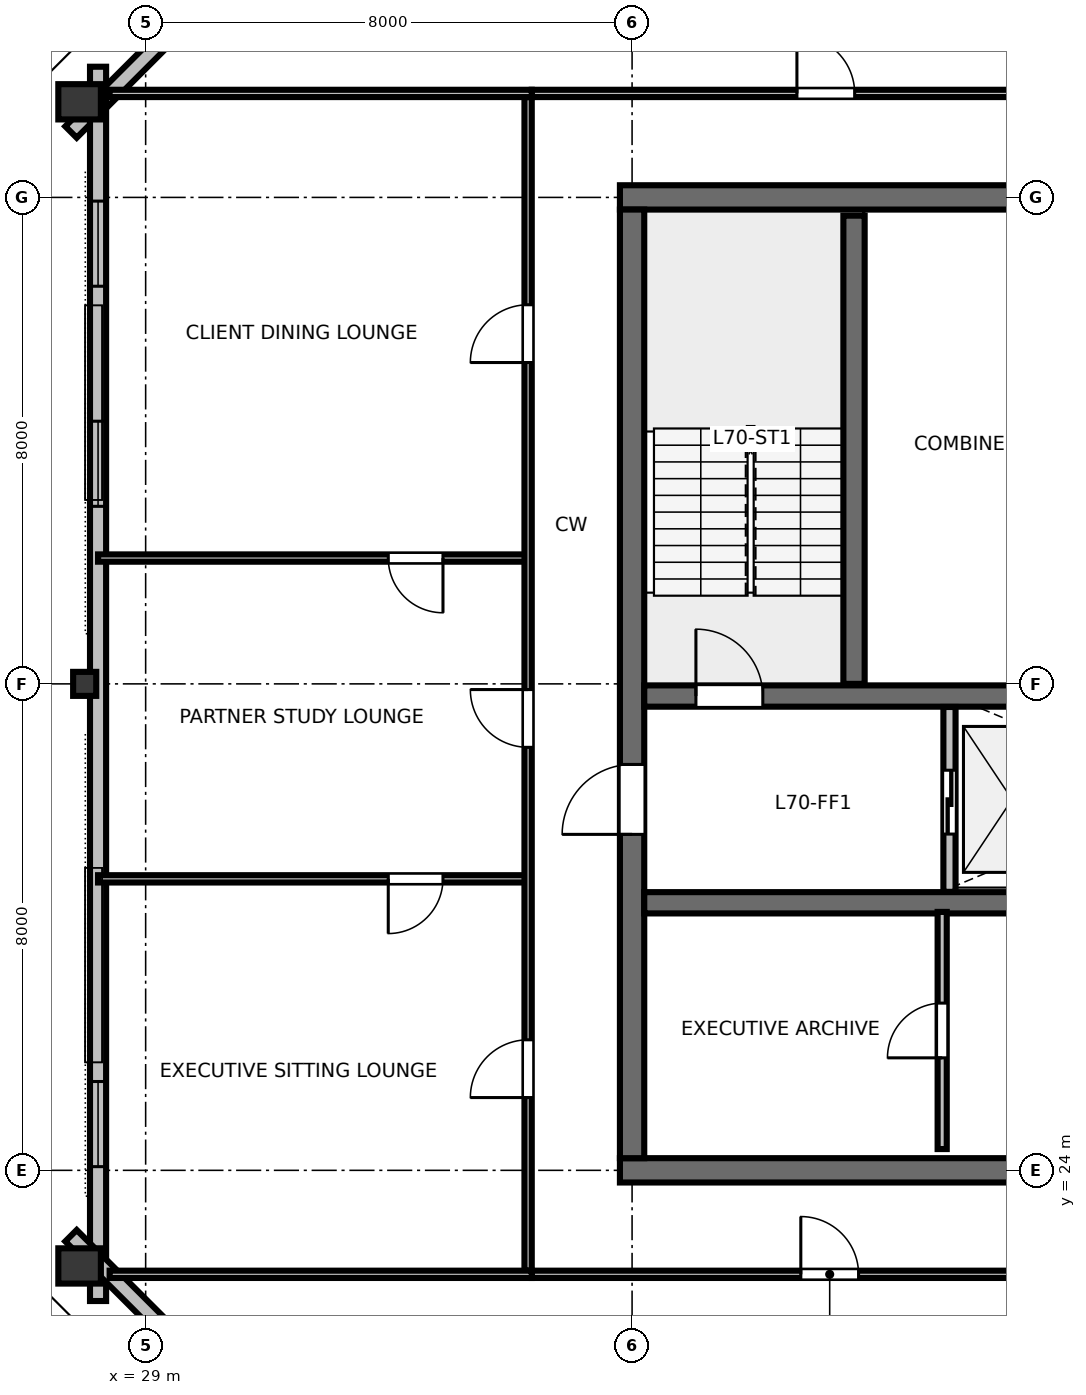
"""IFC4 building model, lengths in metres.
Left out: names, types, materials, properties, quantities, classifications, styles, units other than length and angle.
Written with IfcOpenShell. Run it as: python <this file> out.ifc"""

import sys

from ifc_helpers import new_model, si_unit, direction, frame, frame_2d, origin, origin_2d, place, context, subcontext, project, spatial, rectangle, hollow_rectangle, i_section, extrude, element, fill, save


model = new_model("IFC4")
c1 = context("Model", 3, precision=1e-05, world=origin(), true_north=direction((0.0, 1.0)))
c2 = subcontext(c1, "Body", "Model", "MODEL_VIEW")
j1 = project(units=[si_unit("LENGTHUNIT", "METRE"), si_unit("PLANEANGLEUNIT", "RADIAN")], contexts=[c1])
p1 = place(None, origin())
s1 = spatial("IfcSite", under=j1, at=p1, CompositionType="ELEMENT")
p2 = place(p1, origin())
s2 = spatial("IfcBuilding", under=s1, at=p2, CompositionType="ELEMENT")
p3 = place(p2, frame((0.0, 0.0, 264.6)))
s3 = spatial("IfcBuildingStorey", under=s2, at=p3, CompositionType="ELEMENT", Elevation=264.6)
p4 = place(p3, frame((36.8, 24.0, 0.0), z_axis=(0.0, 0.0, 1.0), x_axis=(1.0, 0.0, 0.0)))
e1 = element("IfcWall", 1, at=p4, inside=s3, PredefinedType="SHEAR", context=c2, shape_type="SweptSolid", body=[
    extrude(rectangle(XDim=18.4, YDim=0.4, at=frame_2d((9.2, 0.0))), origin(), (0.0, 0.0, 1.0), 3.36),
])
p5 = place(p4, frame((13.4, 0.0, 0.0)))
e2 = element("IfcOpeningElement", 2, at=p5, cuts=e1, PredefinedType="OPENING", context=c2, shape_type="SweptSolid", body=[
    extrude(rectangle(XDim=1.6, YDim=2.15, at=frame_2d((0.8, 1.075))), frame((0.0, 0.21, 0.0), z_axis=(0.0, -1.0, 0.0), x_axis=(1.0, 0.0, 0.0)), (0.0, 0.0, 1.0), 0.42),
])
p6 = place(p3, frame((36.8, 40.0, 0.0), z_axis=(0.0, 0.0, 1.0), x_axis=(1.0, 0.0, 0.0)))
e3 = element("IfcWall", 3, at=p6, inside=s3, PredefinedType="SHEAR", context=c2, shape_type="SweptSolid", body=[
    extrude(rectangle(XDim=18.4, YDim=0.4, at=frame_2d((9.2, 0.0))), origin(), (0.0, 0.0, 1.0), 3.36),
])
p7 = place(p6, frame((10.5, 0.0, 0.0)))
e4 = element("IfcOpeningElement", 4, at=p7, cuts=e3, PredefinedType="OPENING", context=c2, shape_type="SweptSolid", body=[
    extrude(rectangle(XDim=1.0, YDim=2.15, at=frame_2d((0.5, 1.075))), frame((0.0, 0.21, 0.0), z_axis=(0.0, -1.0, 0.0), x_axis=(1.0, 0.0, 0.0)), (0.0, 0.0, 1.0), 0.42),
])
p8 = place(p3, frame((37.0, 24.2, 0.0), z_axis=(0.0, 0.0, 1.0), x_axis=(0.0, 1.0, 0.0)))
e5 = element("IfcWall", 5, at=p8, inside=s3, PredefinedType="SHEAR", context=c2, shape_type="SweptSolid", body=[
    extrude(rectangle(XDim=15.6, YDim=0.4, at=frame_2d((7.8, 0.0))), origin(), (0.0, 0.0, 1.0), 3.36),
])
p9 = place(p8, frame((5.325, 0.0, 0.0)))
e6 = element("IfcOpeningElement", 6, at=p9, cuts=e5, PredefinedType="OPENING", context=c2, shape_type="SweptSolid", body=[
    extrude(rectangle(XDim=1.15, YDim=2.15, at=frame_2d((0.575, 1.075))), frame((0.0, 0.21, 0.0), z_axis=(0.0, -1.0, 0.0), x_axis=(1.0, 0.0, 0.0)), (0.0, 0.0, 1.0), 0.42),
])
p10 = place(p3, frame((37.2, 31.8, 0.0), z_axis=(0.0, 0.0, 1.0), x_axis=(1.0, 0.0, 0.0)))
e7 = element("IfcWall", 7, at=p10, inside=s3, PredefinedType="SHEAR", context=c2, shape_type="SweptSolid", body=[
    extrude(rectangle(XDim=17.6, YDim=0.35, at=frame_2d((8.8, 0.0))), origin(), (0.0, 0.0, 1.0), 3.36),
])
p11 = place(p10, frame((0.85, 0.0, 0.0)))
e8 = element("IfcOpeningElement", 8, at=p11, cuts=e7, PredefinedType="OPENING", context=c2, shape_type="SweptSolid", body=[
    extrude(rectangle(XDim=1.1, YDim=2.15, at=frame_2d((0.55, 1.075))), frame((0.0, 0.185, 0.0), z_axis=(0.0, -1.0, 0.0), x_axis=(1.0, 0.0, 0.0)), (0.0, 0.0, 1.0), 0.37),
])
p12 = place(p10, frame((14.75, 0.0, 0.0)))
e9 = element("IfcOpeningElement", 9, at=p12, cuts=e7, PredefinedType="OPENING", context=c2, shape_type="SweptSolid", body=[
    extrude(rectangle(XDim=1.1, YDim=2.15, at=frame_2d((0.55, 1.075))), frame((0.0, 0.185, 0.0), z_axis=(0.0, -1.0, 0.0), x_axis=(1.0, 0.0, 0.0)), (0.0, 0.0, 1.0), 0.37),
])
p13 = place(p3, frame((37.2, 28.4, 0.0), z_axis=(0.0, 0.0, 1.0), x_axis=(1.0, 0.0, 0.0)))
e10 = element("IfcWall", 10, at=p13, inside=s3, PredefinedType="SHEAR", context=c2, shape_type="SweptSolid", body=[
    extrude(rectangle(XDim=17.6, YDim=0.35, at=frame_2d((8.8, 0.0))), origin(), (0.0, 0.0, 1.0), 3.36),
])
p14 = place(p3, frame((27.914, 41.572, 0.0), z_axis=(0.0, 0.0, 1.0), x_axis=(0.0, 1.0, 0.0)))
e11 = element("IfcColumn", 11, at=p14, inside=s3, PredefinedType="COLUMN", context=c2, shape_type="SweptSolid", body=[
    extrude(hollow_rectangle(XDim=0.58, YDim=0.7, WallThickness=0.032, at=origin_2d()), origin(), (0.0, 0.0, 1.0), 3.373),
])
p15 = place(p3, frame((27.997, 32.0, 0.0), z_axis=(0.0, 0.0, 1.0), x_axis=(0.0, 1.0, 0.0)))
e12 = element("IfcColumn", 12, at=p15, inside=s3, PredefinedType="COLUMN", context=c2, shape_type="SweptSolid", body=[
    extrude(i_section(OverallWidth=0.395, OverallDepth=0.38, WebThickness=0.019, FlangeThickness=0.03, FilletRadius=0.025, at=origin_2d()), origin(), (0.0, 0.0, 1.0), 3.373),
])
p16 = place(p3, frame((27.914, 22.428, 0.0), z_axis=(0.0, 0.0, 1.0), x_axis=(0.0, 1.0, 0.0)))
e13 = element("IfcColumn", 13, at=p16, inside=s3, PredefinedType="COLUMN", context=c2, shape_type="SweptSolid", body=[
    extrude(hollow_rectangle(XDim=0.58, YDim=0.7, WallThickness=0.032, at=origin_2d()), origin(), (0.0, 0.0, 1.0), 3.373),
])
p17 = place(p3, frame((35.53, 48.832, 0.0), z_axis=(0.0, 0.0, 1.0), x_axis=(-0.707106781187, -0.707106781187, 0.0)))
e14 = element("IfcWall", 14, at=p17, inside=s3, PredefinedType="STANDARD", context=c2, shape_type="SweptSolid", body=[
    extrude(rectangle(XDim=10.971, YDim=0.265, at=frame_2d((5.485, 0.0))), origin(), (0.0, 0.0, 1.0), 2.832),
])
p18 = place(p3, frame((28.217, 42.149, 0.0), z_axis=(0.0, 0.0, 1.0), x_axis=(0.0, -1.0, 0.0)))
e15 = element("IfcWall", 15, at=p18, inside=s3, PredefinedType="STANDARD", context=c2, shape_type="SweptSolid", body=[
    extrude(rectangle(XDim=20.298, YDim=0.265, at=frame_2d((10.149, 0.0))), origin(), (0.0, 0.0, 1.0), 2.832),
])
p19 = place(p18, frame((2.21, 0.0, 0.85)))
e16 = element("IfcOpeningElement", 16, at=p19, cuts=e15, PredefinedType="OPENING", context=c2, shape_type="SweptSolid", body=[
    extrude(rectangle(XDim=1.4, YDim=1.2, at=frame_2d((0.7, 0.6))), frame((0.0, 0.142, 0.0), z_axis=(0.0, -1.0, 0.0), x_axis=(1.0, 0.0, 0.0)), (0.0, 0.0, 1.0), 0.285),
])
p20 = place(p18, frame((5.83, 0.0, 0.85)))
e17 = element("IfcOpeningElement", 17, at=p20, cuts=e15, PredefinedType="OPENING", context=c2, shape_type="SweptSolid", body=[
    extrude(rectangle(XDim=1.4, YDim=1.2, at=frame_2d((0.7, 0.6))), frame((0.0, 0.142, 0.0), z_axis=(0.0, -1.0, 0.0), x_axis=(1.0, 0.0, 0.0)), (0.0, 0.0, 1.0), 0.285),
])
p21 = place(p18, frame((16.688, 0.0, 0.85)))
e18 = element("IfcOpeningElement", 18, at=p21, cuts=e15, PredefinedType="OPENING", context=c2, shape_type="SweptSolid", body=[
    extrude(rectangle(XDim=1.4, YDim=1.2, at=frame_2d((0.7, 0.6))), frame((0.0, 0.142, 0.0), z_axis=(0.0, -1.0, 0.0), x_axis=(1.0, 0.0, 0.0)), (0.0, 0.0, 1.0), 0.285),
])
p22 = place(p3, frame((27.772, 22.925, 0.0), z_axis=(0.0, 0.0, 1.0), x_axis=(0.707106781187, -0.707106781187, 0.0)))
e19 = element("IfcWall", 19, at=p22, inside=s3, PredefinedType="STANDARD", context=c2, shape_type="SweptSolid", body=[
    extrude(rectangle(XDim=10.971, YDim=0.265, at=frame_2d((5.485, 0.0))), origin(), (0.0, 0.0, 1.0), 2.832),
])
p23 = place(p3, frame((40.65, 32.0, 0.0), z_axis=(0.0, 0.0, 1.0), x_axis=(0.0, 1.0, 0.0)))
e20 = element("IfcWall", 20, at=p23, inside=s3, PredefinedType="SHEAR", context=c2, shape_type="SweptSolid", body=[
    extrude(rectangle(XDim=7.7, YDim=0.35, at=frame_2d((3.85, 0.0))), origin(), (0.0, 0.0, 1.0), 3.6),
])
p24 = place(p3, frame((42.22, 28.58, 0.0), z_axis=(0.0, 0.0, 1.0), x_axis=(0.0, 1.0, 0.0)))
e21 = element("IfcWall", 21, at=p24, inside=s3, PredefinedType="PARTITIONING", context=c2, shape_type="SweptSolid", body=[
    extrude(rectangle(XDim=3.04, YDim=0.2, at=frame_2d((1.52, 0.0))), origin(), (0.0, 0.0, 1.0), 3.375),
])
p25 = place(p24, frame((0.95, 0.0, 0.0)))
e22 = element("IfcOpeningElement", 22, at=p25, cuts=e21, PredefinedType="OPENING", context=c2, shape_type="SweptSolid", body=[
    extrude(rectangle(XDim=1.05, YDim=2.15, at=frame_2d((0.525, 1.075))), frame((0.0, 0.11, 0.0), z_axis=(0.0, -1.0, 0.0), x_axis=(1.0, 0.0, 0.0)), (0.0, 0.0, 1.0), 0.22),
])
p26 = place(p3, frame((42.1, 24.35, 0.0), z_axis=(0.0, 0.0, 1.0), x_axis=(0.0, 1.0, 0.0)))
e23 = element("IfcWall", 23, at=p26, inside=s3, PredefinedType="PARTITIONING", context=c2, shape_type="SweptSolid", body=[
    extrude(rectangle(XDim=3.9, YDim=0.15, at=frame_2d((1.95, 0.0))), origin(), (0.0, 0.0, 1.0), 3.375),
])
p27 = place(p26, frame((1.5, 0.0, 0.0)))
e24 = element("IfcOpeningElement", 24, at=p27, cuts=e23, PredefinedType="OPENING", context=c2, shape_type="SweptSolid", body=[
    extrude(rectangle(XDim=0.9, YDim=2.15, at=frame_2d((0.45, 1.075))), frame((0.0, 0.085, 0.0), z_axis=(0.0, -1.0, 0.0), x_axis=(1.0, 0.0, 0.0)), (0.0, 0.0, 1.0), 0.17),
])
p28 = place(p3, frame((35.35, 22.29, 0.0), z_axis=(0.0, 0.0, 1.0), x_axis=(1.0, 0.0, 0.0)))
e25 = element("IfcWall", 25, at=p28, inside=s3, PredefinedType="PARTITIONING", context=c2, shape_type="SweptSolid", body=[
    extrude(rectangle(XDim=21.3, YDim=0.12, at=frame_2d((10.65, 0.0))), origin(), (0.0, 0.0, 1.0), 2.655),
])
p29 = place(p28, frame((4.425, 0.0, 0.0)))
e26 = element("IfcOpeningElement", 26, at=p29, cuts=e25, PredefinedType="OPENING", context=c2, shape_type="SweptSolid", body=[
    extrude(rectangle(XDim=0.95, YDim=2.15, at=frame_2d((0.475, 1.075))), frame((0.0, 0.07, 0.0), z_axis=(0.0, -1.0, 0.0), x_axis=(1.0, 0.0, 0.0)), (0.0, 0.0, 1.0), 0.14),
])
p30 = place(p28, frame((13.051, 0.0, 0.0)))
e27 = element("IfcOpeningElement", 27, at=p30, cuts=e25, PredefinedType="OPENING", context=c2, shape_type="SweptSolid", body=[
    extrude(rectangle(XDim=0.95, YDim=2.15, at=frame_2d((0.475, 1.075))), frame((0.0, 0.07, 0.0), z_axis=(0.0, -1.0, 0.0), x_axis=(1.0, 0.0, 0.0)), (0.0, 0.0, 1.0), 0.14),
])
p31 = place(p28, frame((17.811, 0.0, 0.0)))
e28 = element("IfcOpeningElement", 28, at=p31, cuts=e25, PredefinedType="OPENING", context=c2, shape_type="SweptSolid", body=[
    extrude(rectangle(XDim=0.95, YDim=2.15, at=frame_2d((0.475, 1.075))), frame((0.0, 0.07, 0.0), z_axis=(0.0, -1.0, 0.0), x_axis=(1.0, 0.0, 0.0)), (0.0, 0.0, 1.0), 0.14),
])
p32 = place(p3, frame((35.35, 41.71, 0.0), z_axis=(0.0, 0.0, 1.0), x_axis=(1.0, 0.0, 0.0)))
e29 = element("IfcWall", 29, at=p32, inside=s3, PredefinedType="PARTITIONING", context=c2, shape_type="SweptSolid", body=[
    extrude(rectangle(XDim=21.3, YDim=0.12, at=frame_2d((10.65, 0.0))), origin(), (0.0, 0.0, 1.0), 2.655),
])
p33 = place(p32, frame((4.361, 0.0, 0.0)))
e30 = element("IfcOpeningElement", 30, at=p33, cuts=e29, PredefinedType="OPENING", context=c2, shape_type="SweptSolid", body=[
    extrude(rectangle(XDim=0.95, YDim=2.15, at=frame_2d((0.475, 1.075))), frame((0.0, 0.07, 0.0), z_axis=(0.0, -1.0, 0.0), x_axis=(1.0, 0.0, 0.0)), (0.0, 0.0, 1.0), 0.14),
])
p34 = place(p32, frame((15.925, 0.0, 0.0)))
e31 = element("IfcOpeningElement", 31, at=p34, cuts=e29, PredefinedType="OPENING", context=c2, shape_type="SweptSolid", body=[
    extrude(rectangle(XDim=0.95, YDim=2.15, at=frame_2d((0.475, 1.075))), frame((0.0, 0.07, 0.0), z_axis=(0.0, -1.0, 0.0), x_axis=(1.0, 0.0, 0.0)), (0.0, 0.0, 1.0), 0.14),
])
p35 = place(p3, frame((35.29, 28.794, 0.0), z_axis=(0.0, 0.0, 1.0), x_axis=(-1.0, 0.0, 0.0)))
e32 = element("IfcWall", 32, at=p35, inside=s3, PredefinedType="PARTITIONING", context=c2, shape_type="SweptSolid", body=[
    extrude(rectangle(XDim=7.073, YDim=0.12, at=frame_2d((3.536, 0.0))), origin(), (0.0, 0.0, 1.0), 2.655),
])
p36 = place(p35, frame((1.4, 0.0, 0.0)))
e33 = element("IfcOpeningElement", 33, at=p36, cuts=e32, PredefinedType="OPENING", context=c2, shape_type="SweptSolid", body=[
    extrude(rectangle(XDim=0.9, YDim=2.15, at=frame_2d((0.45, 1.075))), frame((0.0, 0.07, 0.0), z_axis=(0.0, -1.0, 0.0), x_axis=(1.0, 0.0, 0.0)), (0.0, 0.0, 1.0), 0.14),
])
p37 = place(p3, frame((35.29, 34.069, 0.0), z_axis=(0.0, 0.0, 1.0), x_axis=(-1.0, 0.0, 0.0)))
e34 = element("IfcWall", 34, at=p37, inside=s3, PredefinedType="PARTITIONING", context=c2, shape_type="SweptSolid", body=[
    extrude(rectangle(XDim=7.073, YDim=0.12, at=frame_2d((3.536, 0.0))), origin(), (0.0, 0.0, 1.0), 2.655),
])
p38 = place(p37, frame((1.4, 0.0, 0.0)))
e35 = element("IfcOpeningElement", 35, at=p38, cuts=e34, PredefinedType="OPENING", context=c2, shape_type="SweptSolid", body=[
    extrude(rectangle(XDim=0.9, YDim=2.15, at=frame_2d((0.45, 1.075))), frame((0.0, 0.07, 0.0), z_axis=(0.0, -1.0, 0.0), x_axis=(1.0, 0.0, 0.0)), (0.0, 0.0, 1.0), 0.14),
])
p39 = place(p3, frame((35.29, 22.35, 0.0), z_axis=(0.0, 0.0, 1.0), x_axis=(0.0, 1.0, 0.0)))
e36 = element("IfcWall", 36, at=p39, inside=s3, PredefinedType="PARTITIONING", context=c2, shape_type="SweptSolid", body=[
    extrude(rectangle(XDim=19.3, YDim=0.12, at=frame_2d((9.65, 0.0))), origin(), (0.0, 0.0, 1.0), 2.655),
])
p40 = place(p39, frame((2.847, 0.0, 0.0)))
e37 = element("IfcOpeningElement", 37, at=p40, cuts=e36, PredefinedType="OPENING", context=c2, shape_type="SweptSolid", body=[
    extrude(rectangle(XDim=0.95, YDim=2.15, at=frame_2d((0.475, 1.075))), frame((0.0, 0.07, 0.0), z_axis=(0.0, -1.0, 0.0), x_axis=(1.0, 0.0, 0.0)), (0.0, 0.0, 1.0), 0.14),
])
p41 = place(p39, frame((8.606, 0.0, 0.0)))
e38 = element("IfcOpeningElement", 38, at=p41, cuts=e36, PredefinedType="OPENING", context=c2, shape_type="SweptSolid", body=[
    extrude(rectangle(XDim=0.95, YDim=2.15, at=frame_2d((0.475, 1.075))), frame((0.0, 0.07, 0.0), z_axis=(0.0, -1.0, 0.0), x_axis=(1.0, 0.0, 0.0)), (0.0, 0.0, 1.0), 0.14),
])
p42 = place(p39, frame((14.935, 0.0, 0.0)))
e39 = element("IfcOpeningElement", 39, at=p42, cuts=e36, PredefinedType="OPENING", context=c2, shape_type="SweptSolid", body=[
    extrude(rectangle(XDim=0.95, YDim=2.15, at=frame_2d((0.475, 1.075))), frame((0.0, 0.07, 0.0), z_axis=(0.0, -1.0, 0.0), x_axis=(1.0, 0.0, 0.0)), (0.0, 0.0, 1.0), 0.14),
])
for number, where, z_axis, x_axis in (
    (40, (35.35, 22.29, 0.0), (0.0, 0.0, 1.0), (-1.0, 0.0, 0.0)),
    (41, (35.35, 41.71, 0.0), (0.0, 0.0, 1.0), (-1.0, 0.0, 0.0)),
):
    element("IfcWall", number, at=place(p3, frame(where, z_axis=z_axis, x_axis=x_axis)), inside=s3, PredefinedType="PARTITIONING", context=c2, shape_type="SweptSolid", body=[
        extrude(rectangle(XDim=6.942, YDim=0.12, at=frame_2d((3.471, 0.0))), origin(), (0.0, 0.0, 1.0), 2.655),
    ])
p43 = place(p19, origin())
e42 = element("IfcWindow", 42, at=p43, inside=s3, PartitioningType="SINGLE_PANEL", PredefinedType="WINDOW", context=c2, shape_type="SweptSolid", body=[
    extrude(rectangle(XDim=1.4, YDim=1.2, at=frame_2d((0.7, 0.6))), frame((0.0, 0.03, 0.0), z_axis=(0.0, -1.0, 0.0), x_axis=(1.0, 0.0, 0.0)), (0.0, 0.0, 1.0), 0.06),
])
fill(e16, e42)
p44 = place(p20, origin())
e43 = element("IfcWindow", 43, at=p44, inside=s3, PartitioningType="SINGLE_PANEL", PredefinedType="WINDOW", context=c2, shape_type="SweptSolid", body=[
    extrude(rectangle(XDim=1.4, YDim=1.2, at=frame_2d((0.7, 0.6))), frame((0.0, 0.03, 0.0), z_axis=(0.0, -1.0, 0.0), x_axis=(1.0, 0.0, 0.0)), (0.0, 0.0, 1.0), 0.06),
])
fill(e17, e43)
p45 = place(p21, origin())
e44 = element("IfcWindow", 44, at=p45, inside=s3, PartitioningType="SINGLE_PANEL", PredefinedType="WINDOW", context=c2, shape_type="SweptSolid", body=[
    extrude(rectangle(XDim=1.4, YDim=1.2, at=frame_2d((0.7, 0.6))), frame((0.0, 0.03, 0.0), z_axis=(0.0, -1.0, 0.0), x_axis=(1.0, 0.0, 0.0)), (0.0, 0.0, 1.0), 0.06),
])
fill(e18, e44)
p46 = place(p11, origin())
e45 = element("IfcDoor", 45, at=p46, inside=s3, OperationType="SINGLE_SWING_LEFT", PredefinedType="DOOR", context=c2, shape_type="SweptSolid", body=[
    extrude(rectangle(XDim=1.1, YDim=2.15, at=frame_2d((0.55, 1.075))), frame((0.0, 0.025, 0.0), z_axis=(0.0, -1.0, 0.0), x_axis=(1.0, 0.0, 0.0)), (0.0, 0.0, 1.0), 0.05),
])
fill(e8, e45)
p47 = place(p9, origin())
e46 = element("IfcDoor", 46, at=p47, inside=s3, OperationType="SINGLE_SWING_LEFT", PredefinedType="DOOR", context=c2, shape_type="SweptSolid", body=[
    extrude(rectangle(XDim=1.15, YDim=2.15, at=frame_2d((0.575, 1.075))), frame((0.0, 0.025, 0.0), z_axis=(0.0, -1.0, 0.0), x_axis=(1.0, 0.0, 0.0)), (0.0, 0.0, 1.0), 0.05),
])
fill(e6, e46)
p48 = place(p25, origin())
e47 = element("IfcDoor", 47, at=p48, inside=s3, OperationType="SLIDING_TO_LEFT", PredefinedType="DOOR", context=c2, shape_type="SweptSolid", body=[
    extrude(rectangle(XDim=1.05, YDim=2.15, at=frame_2d((0.525, 1.075))), frame((0.0, 0.025, 0.0), z_axis=(0.0, -1.0, 0.0), x_axis=(1.0, 0.0, 0.0)), (0.0, 0.0, 1.0), 0.05),
])
fill(e22, e47)
p49 = place(p27, origin())
e48 = element("IfcDoor", 48, at=p49, inside=s3, OperationType="SINGLE_SWING_LEFT", PredefinedType="DOOR", context=c2, shape_type="SweptSolid", body=[
    extrude(rectangle(XDim=0.9, YDim=2.15, at=frame_2d((0.45, 1.075))), frame((0.0, 0.025, 0.0), z_axis=(0.0, -1.0, 0.0), x_axis=(1.0, 0.0, 0.0)), (0.0, 0.0, 1.0), 0.05),
])
fill(e24, e48)
p50 = place(p29, origin())
e49 = element("IfcDoor", 49, at=p50, inside=s3, OperationType="SINGLE_SWING_LEFT", PredefinedType="DOOR", context=c2, shape_type="SweptSolid", body=[
    extrude(rectangle(XDim=0.95, YDim=2.15, at=frame_2d((0.475, 1.075))), frame((0.0, 0.025, 0.0), z_axis=(0.0, -1.0, 0.0), x_axis=(1.0, 0.0, 0.0)), (0.0, 0.0, 1.0), 0.05),
])
fill(e26, e49)
p51 = place(p33, origin())
e50 = element("IfcDoor", 50, at=p51, inside=s3, OperationType="SINGLE_SWING_LEFT", PredefinedType="DOOR", context=c2, shape_type="SweptSolid", body=[
    extrude(rectangle(XDim=0.95, YDim=2.15, at=frame_2d((0.475, 1.075))), frame((0.0, 0.025, 0.0), z_axis=(0.0, -1.0, 0.0), x_axis=(1.0, 0.0, 0.0)), (0.0, 0.0, 1.0), 0.05),
])
fill(e30, e50)
p52 = place(p36, origin())
e51 = element("IfcDoor", 51, at=p52, inside=s3, OperationType="SINGLE_SWING_RIGHT", PredefinedType="DOOR", context=c2, shape_type="SweptSolid", body=[
    extrude(rectangle(XDim=0.9, YDim=2.15, at=frame_2d((0.45, 1.075))), frame((0.0, 0.025, 0.0), z_axis=(0.0, -1.0, 0.0), x_axis=(1.0, 0.0, 0.0)), (0.0, 0.0, 1.0), 0.05),
])
fill(e33, e51)
p53 = place(p38, origin())
e52 = element("IfcDoor", 52, at=p53, inside=s3, OperationType="SINGLE_SWING_LEFT", PredefinedType="DOOR", context=c2, shape_type="SweptSolid", body=[
    extrude(rectangle(XDim=0.9, YDim=2.15, at=frame_2d((0.45, 1.075))), frame((0.0, 0.025, 0.0), z_axis=(0.0, -1.0, 0.0), x_axis=(1.0, 0.0, 0.0)), (0.0, 0.0, 1.0), 0.05),
])
fill(e35, e52)
p54 = place(p40, origin())
e53 = element("IfcDoor", 53, at=p54, inside=s3, OperationType="SINGLE_SWING_LEFT", PredefinedType="DOOR", context=c2, shape_type="SweptSolid", body=[
    extrude(rectangle(XDim=0.95, YDim=2.15, at=frame_2d((0.475, 1.075))), frame((0.0, 0.025, 0.0), z_axis=(0.0, -1.0, 0.0), x_axis=(1.0, 0.0, 0.0)), (0.0, 0.0, 1.0), 0.05),
])
fill(e37, e53)
p55 = place(p41, origin())
e54 = element("IfcDoor", 54, at=p55, inside=s3, OperationType="SINGLE_SWING_RIGHT", PredefinedType="DOOR", context=c2, shape_type="SweptSolid", body=[
    extrude(rectangle(XDim=0.95, YDim=2.15, at=frame_2d((0.475, 1.075))), frame((0.0, 0.025, 0.0), z_axis=(0.0, -1.0, 0.0), x_axis=(1.0, 0.0, 0.0)), (0.0, 0.0, 1.0), 0.05),
])
fill(e38, e54)
p56 = place(p42, origin())
e55 = element("IfcDoor", 55, at=p56, inside=s3, OperationType="SINGLE_SWING_LEFT", PredefinedType="DOOR", context=c2, shape_type="SweptSolid", body=[
    extrude(rectangle(XDim=0.95, YDim=2.15, at=frame_2d((0.475, 1.075))), frame((0.0, 0.025, 0.0), z_axis=(0.0, -1.0, 0.0), x_axis=(1.0, 0.0, 0.0)), (0.0, 0.0, 1.0), 0.05),
])
fill(e39, e55)
save(model, sys.argv[1])
